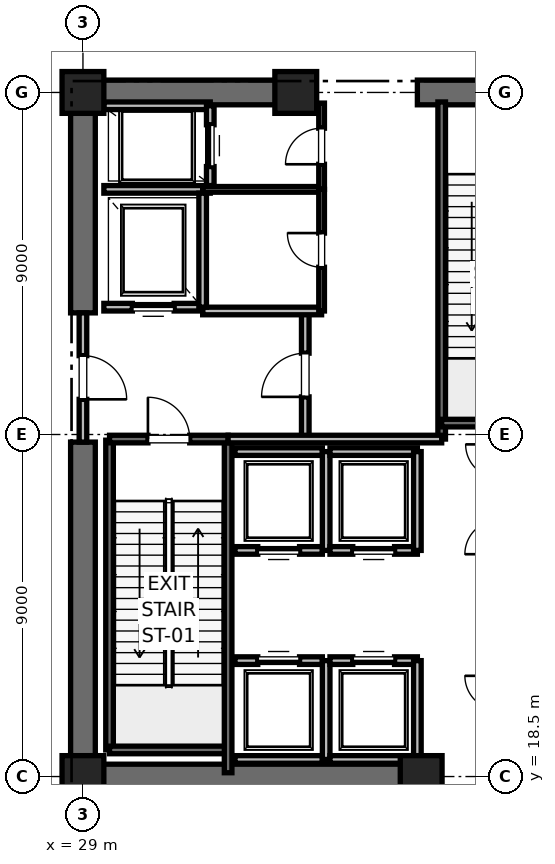
"""IFC4 building model, lengths in metres.
Left out: names, types, materials, properties, quantities, classifications, styles, units other than length and angle.
Written with IfcOpenShell. Run it as: python <this file> out.ifc"""

import sys

from ifc_helpers import new_model, si_unit, direction, frame, frame_2d, origin, origin_2d, place, context, subcontext, project, spatial, rectangle, extrude, element, fill, save


model = new_model("IFC4")
c1 = context("Model", 3, precision=1e-05, world=origin(), true_north=direction((0.0, 1.0)))
c2 = subcontext(c1, "Body", "Model", "MODEL_VIEW")
j1 = project(units=[si_unit("LENGTHUNIT", "METRE"), si_unit("PLANEANGLEUNIT", "RADIAN")], contexts=[c1])
p1 = place(None, origin())
s1 = spatial("IfcSite", under=j1, at=p1, CompositionType="ELEMENT")
p2 = place(p1, origin())
s2 = spatial("IfcBuilding", under=s1, at=p2, CompositionType="ELEMENT")
p3 = place(p2, origin())
s3 = spatial("IfcBuildingStorey", under=s2, at=p3, CompositionType="ELEMENT", Elevation=0.0)
for number, where, z_axis, x_axis in (
    (1, (29.0, 18.5, 0.0), (0.0, 0.0, 1.0), (1.0, 0.0, 0.0)),
    (2, (29.0, 36.5, 0.0), (0.0, 0.0, 1.0), (1.0, 0.0, 0.0)),
    (3, (37.9, 18.5, 0.0), (0.0, 0.0, 1.0), (1.0, 0.0, 0.0)),
    (4, (34.6, 36.5, 0.0), (0.0, 0.0, 1.0), (1.0, 0.0, 0.0)),
):
    element("IfcColumn", number, at=place(p3, frame(where, z_axis=z_axis, x_axis=x_axis)), inside=s3, PredefinedType="PILASTER", context=c2, shape_type="SweptSolid", body=[
        extrude(rectangle(XDim=1.1, YDim=1.1, at=origin_2d()), origin(), (0.0, 0.0, 1.0), 6.0),
    ])
p4 = place(p3, frame((29.0, 18.5, 0.0), z_axis=(0.0, 0.0, 1.0), x_axis=(1.0, 0.0, 0.0)))
e5 = element("IfcWall", 5, at=p4, inside=s3, PredefinedType="SHEAR", context=c2, shape_type="SweptSolid", body=[
    extrude(rectangle(XDim=9.2, YDim=0.65, at=frame_2d((4.6, 0.0))), origin(), (0.0, 0.0, 1.0), 5.72),
])
p5 = place(p3, frame((29.0, 36.5, 0.0), z_axis=(0.0, 0.0, 1.0), x_axis=(1.0, 0.0, 0.0)))
e6 = element("IfcWall", 6, at=p5, inside=s3, PredefinedType="SHEAR", context=c2, shape_type="SweptSolid", body=[
    extrude(rectangle(XDim=5.8, YDim=0.65, at=frame_2d((2.9, 0.0))), origin(), (0.0, 0.0, 1.0), 5.72),
])
p6 = place(p3, frame((37.8, 36.5, 0.0), z_axis=(0.0, 0.0, 1.0), x_axis=(1.0, 0.0, 0.0)))
e7 = element("IfcWall", 7, at=p6, inside=s3, PredefinedType="SHEAR", context=c2, shape_type="SweptSolid", body=[
    extrude(rectangle(XDim=4.4, YDim=0.65, at=frame_2d((2.2, 0.0))), origin(), (0.0, 0.0, 1.0), 5.72),
])
p7 = place(p6, frame((1.65, 0.0, 0.0)))
e8 = element("IfcOpeningElement", 8, at=p7, cuts=e7, PredefinedType="OPENING", context=c2, shape_type="SweptSolid", body=[
    extrude(rectangle(XDim=1.1, YDim=2.15, at=frame_2d((0.55, 1.075))), frame((0.0, 0.325, 0.0), z_axis=(0.0, -1.0, 0.0), x_axis=(1.0, 0.0, 0.0)), (0.0, 0.0, 1.0), 0.65),
])
p8 = place(p3, frame((29.0, 18.5, 0.0), z_axis=(0.0, 0.0, 1.0), x_axis=(0.0, 1.0, 0.0)))
e9 = element("IfcWall", 9, at=p8, inside=s3, PredefinedType="SHEAR", context=c2, shape_type="SweptSolid", body=[
    extrude(rectangle(XDim=8.8, YDim=0.65, at=frame_2d((4.4, 0.0))), origin(), (0.0, 0.0, 1.0), 5.72),
])
p9 = place(p3, frame((29.0, 30.7, 0.0), z_axis=(0.0, 0.0, 1.0), x_axis=(0.0, 1.0, 0.0)))
e10 = element("IfcWall", 10, at=p9, inside=s3, PredefinedType="SHEAR", context=c2, shape_type="SweptSolid", body=[
    extrude(rectangle(XDim=5.8, YDim=0.65, at=frame_2d((2.9, 0.0))), origin(), (0.0, 0.0, 1.0), 5.72),
])
p10 = place(p3, frame((29.7, 19.2, 0.0), z_axis=(0.0, 0.0, 1.0), x_axis=(0.0, 1.0, 0.0)))
e11 = element("IfcWall", 11, at=p10, inside=s3, PredefinedType="SOLIDWALL", context=c2, shape_type="SweptSolid", body=[
    extrude(rectangle(XDim=8.15, YDim=0.2, at=frame_2d((4.075, 0.0))), origin(), (0.0, 0.0, 1.0), 5.72),
])
p11 = place(p3, frame((29.7, 19.2, 0.0), z_axis=(0.0, 0.0, 1.0), x_axis=(1.0, 0.0, 0.0)))
e12 = element("IfcWall", 12, at=p11, inside=s3, PredefinedType="SOLIDWALL", context=c2, shape_type="SweptSolid", body=[
    extrude(rectangle(XDim=3.12, YDim=0.2, at=frame_2d((1.56, 0.0))), origin(), (0.0, 0.0, 1.0), 5.72),
])
p12 = place(p3, frame((32.82, 18.6, 0.0), z_axis=(0.0, 0.0, 1.0), x_axis=(0.0, 1.0, 0.0)))
e13 = element("IfcWall", 13, at=p12, inside=s3, PredefinedType="SOLIDWALL", context=c2, shape_type="SweptSolid", body=[
    extrude(rectangle(XDim=8.78, YDim=0.2, at=frame_2d((4.39, 0.0))), origin(), (0.0, 0.0, 1.0), 5.72),
])
p13 = place(p3, frame((29.7, 27.38, 0.0), z_axis=(0.0, 0.0, 1.0), x_axis=(1.0, 0.0, 0.0)))
e14 = element("IfcWall", 14, at=p13, inside=s3, PredefinedType="SOLIDWALL", context=c2, shape_type="SweptSolid", body=[
    extrude(rectangle(XDim=3.12, YDim=0.2, at=frame_2d((1.56, 0.0))), origin(), (0.0, 0.0, 1.0), 5.72),
])
p14 = place(p13, frame((1.01, 0.0, 0.0)))
e15 = element("IfcOpeningElement", 15, at=p14, cuts=e14, PredefinedType="OPENING", context=c2, shape_type="SweptSolid", body=[
    extrude(rectangle(XDim=1.1, YDim=2.15, at=frame_2d((0.55, 1.075))), frame((0.0, 0.1, 0.0), z_axis=(0.0, -1.0, 0.0), x_axis=(1.0, 0.0, 0.0)), (0.0, 0.0, 1.0), 0.2),
])
p15 = place(p3, frame((38.44, 27.38, 0.0), z_axis=(0.0, 0.0, 1.0), x_axis=(0.0, 1.0, 0.0)))
e16 = element("IfcWall", 16, at=p15, inside=s3, PredefinedType="SOLIDWALL", context=c2, shape_type="SweptSolid", body=[
    extrude(rectangle(XDim=8.87, YDim=0.2, at=frame_2d((4.435, 0.0))), origin(), (0.0, 0.0, 1.0), 5.72),
])
p16 = place(p3, frame((38.44, 27.8, 0.0), z_axis=(0.0, 0.0, 1.0), x_axis=(1.0, 0.0, 0.0)))
e17 = element("IfcWall", 17, at=p16, inside=s3, PredefinedType="SOLIDWALL", context=c2, shape_type="SweptSolid", body=[
    extrude(rectangle(XDim=3.32, YDim=0.2, at=frame_2d((1.66, 0.0))), origin(), (0.0, 0.0, 1.0), 5.72),
])
p17 = place(p3, frame((34.85, 27.38, 0.0), z_axis=(0.0, 0.0, 1.0), x_axis=(0.0, 1.0, 0.0)))
e18 = element("IfcWall", 18, at=p17, inside=s3, PredefinedType="PARTITIONING", context=c2, shape_type="SweptSolid", body=[
    extrude(rectangle(XDim=3.37, YDim=0.2, at=frame_2d((1.685, 0.0))), origin(), (0.0, 0.0, 1.0), 5.72),
])
p18 = place(p17, frame((1.11, 0.0, 0.0)))
e19 = element("IfcOpeningElement", 19, at=p18, cuts=e18, PredefinedType="OPENING", context=c2, shape_type="SweptSolid", body=[
    extrude(rectangle(XDim=1.15, YDim=2.2, at=frame_2d((0.575, 1.1))), frame((0.0, 0.1, 0.0), z_axis=(0.0, -1.0, 0.0), x_axis=(1.0, 0.0, 0.0)), (0.0, 0.0, 1.0), 0.2),
])
p19 = place(p3, frame((29.0, 30.7, 0.0), z_axis=(0.0, 0.0, 1.0), x_axis=(0.0, -1.0, 0.0)))
e20 = element("IfcWall", 20, at=p19, inside=s3, PredefinedType="PARTITIONING", context=c2, shape_type="SweptSolid", body=[
    extrude(rectangle(XDim=3.4, YDim=0.2, at=frame_2d((1.7, 0.0))), origin(), (0.0, 0.0, 1.0), 4.5),
])
p20 = place(p19, frame((1.125, 0.0, 0.0)))
e21 = element("IfcOpeningElement", 21, at=p20, cuts=e20, PredefinedType="OPENING", context=c2, shape_type="SweptSolid", body=[
    extrude(rectangle(XDim=1.15, YDim=2.2, at=frame_2d((0.575, 1.1))), frame((0.0, 0.1, 0.0), z_axis=(0.0, -1.0, 0.0), x_axis=(1.0, 0.0, 0.0)), (0.0, 0.0, 1.0), 0.2),
])
p21 = place(p3, frame((32.82, 27.38, 0.0), z_axis=(0.0, 0.0, 1.0), x_axis=(1.0, 0.0, 0.0)))
e22 = element("IfcWall", 22, at=p21, inside=s3, PredefinedType="PARTITIONING", context=c2, shape_type="SweptSolid", body=[
    extrude(rectangle(XDim=5.62, YDim=0.2, at=frame_2d((2.81, 0.0))), origin(), (0.0, 0.0, 1.0), 5.72),
])
p22 = place(p3, frame((32.15, 30.75, 0.0), z_axis=(0.0, 0.0, 1.0), x_axis=(1.0, 0.0, 0.0)))
e23 = element("IfcWall", 23, at=p22, inside=s3, PredefinedType="PARTITIONING", context=c2, shape_type="SweptSolid", body=[
    extrude(rectangle(XDim=3.13, YDim=0.2, at=frame_2d((1.565, 0.0))), origin(), (0.0, 0.0, 1.0), 5.72),
])
p23 = place(p3, frame((29.55, 30.85, 0.0), z_axis=(0.0, 0.0, 1.0), x_axis=(1.0, 0.0, 0.0)))
e24 = element("IfcWall", 24, at=p23, inside=s3, PredefinedType="SOLIDWALL", context=c2, shape_type="SweptSolid", body=[
    extrude(rectangle(XDim=2.6, YDim=0.2, at=frame_2d((1.3, 0.0))), origin(), (0.0, 0.0, 1.0), 4.5),
])
p24 = place(p23, frame((0.75, 0.0, 0.0)))
e25 = element("IfcOpeningElement", 25, at=p24, cuts=e24, PredefinedType="OPENING", context=c2, shape_type="SweptSolid", body=[
    extrude(rectangle(XDim=1.1, YDim=2.2, at=frame_2d((0.55, 1.1))), frame((0.0, 0.1, 0.0), z_axis=(0.0, -1.0, 0.0), x_axis=(1.0, 0.0, 0.0)), (0.0, 0.0, 1.0), 0.2),
])
p25 = place(p3, frame((29.55, 33.95, 0.0), z_axis=(0.0, 0.0, 1.0), x_axis=(1.0, 0.0, 0.0)))
e26 = element("IfcWall", 26, at=p25, inside=s3, PredefinedType="SOLIDWALL", context=c2, shape_type="SweptSolid", body=[
    extrude(rectangle(XDim=2.8, YDim=0.2, at=frame_2d((1.4, 0.0))), origin(), (0.0, 0.0, 1.0), 5.72),
])
p26 = place(p3, frame((32.15, 30.85, 0.0), z_axis=(0.0, 0.0, 1.0), x_axis=(0.0, 1.0, 0.0)))
e27 = element("IfcWall", 27, at=p26, inside=s3, PredefinedType="SOLIDWALL", context=c2, shape_type="SweptSolid", body=[
    extrude(rectangle(XDim=3.0, YDim=0.2, at=frame_2d((1.5, 0.0))), origin(), (0.0, 0.0, 1.0), 5.72),
])
p27 = place(p3, frame((32.35, 36.15, 0.0), z_axis=(0.0, 0.0, 1.0), x_axis=(-1.0, 0.0, 0.0)))
e28 = element("IfcWall", 28, at=p27, inside=s3, PredefinedType="SOLIDWALL", context=c2, shape_type="SweptSolid", body=[
    extrude(rectangle(XDim=2.8, YDim=0.2, at=frame_2d((1.4, 0.0))), origin(), (0.0, 0.0, 1.0), 4.779),
])
p28 = place(p3, frame((32.35, 34.05, 0.0), z_axis=(0.0, 0.0, 1.0), x_axis=(0.0, 1.0, 0.0)))
e29 = element("IfcWall", 29, at=p28, inside=s3, PredefinedType="SOLIDWALL", context=c2, shape_type="SweptSolid", body=[
    extrude(rectangle(XDim=2.1, YDim=0.2, at=frame_2d((1.05, 0.0))), origin(), (0.0, 0.0, 1.0), 5.72),
])
p29 = place(p28, frame((0.5, 0.0, 0.0)))
e30 = element("IfcOpeningElement", 30, at=p29, cuts=e29, PredefinedType="OPENING", context=c2, shape_type="SweptSolid", body=[
    extrude(rectangle(XDim=1.1, YDim=2.2, at=frame_2d((0.55, 1.1))), frame((0.0, 0.1, 0.0), z_axis=(0.0, -1.0, 0.0), x_axis=(1.0, 0.0, 0.0)), (0.0, 0.0, 1.0), 0.2),
])
p30 = place(p3, frame((33.0, 18.95, 0.0), z_axis=(0.0, 0.0, 1.0), x_axis=(1.0, 0.0, 0.0)))
e31 = element("IfcWall", 31, at=p30, inside=s3, PredefinedType="SOLIDWALL", context=c2, shape_type="SweptSolid", body=[
    extrude(rectangle(XDim=2.3, YDim=0.2, at=frame_2d((1.15, 0.0))), origin(), (0.0, 0.0, 1.0), 5.72),
])
p31 = place(p3, frame((35.3, 21.55, 0.0), z_axis=(0.0, 0.0, 1.0), x_axis=(-1.0, 0.0, 0.0)))
e32 = element("IfcWall", 32, at=p31, inside=s3, PredefinedType="SOLIDWALL", context=c2, shape_type="SweptSolid", body=[
    extrude(rectangle(XDim=2.3, YDim=0.2, at=frame_2d((1.15, 0.0))), origin(), (0.0, 0.0, 1.0), 5.72),
])
p32 = place(p31, frame((0.6, 0.0, 0.0)))
e33 = element("IfcOpeningElement", 33, at=p32, cuts=e32, PredefinedType="OPENING", context=c2, shape_type="SweptSolid", body=[
    extrude(rectangle(XDim=1.1, YDim=2.2, at=frame_2d((0.55, 1.1))), frame((0.0, 0.1, 0.0), z_axis=(0.0, -1.0, 0.0), x_axis=(1.0, 0.0, 0.0)), (0.0, 0.0, 1.0), 0.2),
])
p33 = place(p3, frame((35.4, 18.95, 0.0), z_axis=(0.0, 0.0, 1.0), x_axis=(0.0, 1.0, 0.0)))
e34 = element("IfcWall", 34, at=p33, inside=s3, PredefinedType="SOLIDWALL", context=c2, shape_type="SweptSolid", body=[
    extrude(rectangle(XDim=2.6, YDim=0.2, at=frame_2d((1.3, 0.0))), origin(), (0.0, 0.0, 1.0), 5.72),
])
p34 = place(p3, frame((35.5, 18.95, 0.0), z_axis=(0.0, 0.0, 1.0), x_axis=(1.0, 0.0, 0.0)))
e35 = element("IfcWall", 35, at=p34, inside=s3, PredefinedType="SOLIDWALL", context=c2, shape_type="SweptSolid", body=[
    extrude(rectangle(XDim=2.3, YDim=0.2, at=frame_2d((1.15, 0.0))), origin(), (0.0, 0.0, 1.0), 4.5),
])
p35 = place(p3, frame((37.8, 21.55, 0.0), z_axis=(0.0, 0.0, 1.0), x_axis=(-1.0, 0.0, 0.0)))
e36 = element("IfcWall", 36, at=p35, inside=s3, PredefinedType="SOLIDWALL", context=c2, shape_type="SweptSolid", body=[
    extrude(rectangle(XDim=2.3, YDim=0.2, at=frame_2d((1.15, 0.0))), origin(), (0.0, 0.0, 1.0), 5.72),
])
p36 = place(p35, frame((0.6, 0.0, 0.0)))
e37 = element("IfcOpeningElement", 37, at=p36, cuts=e36, PredefinedType="OPENING", context=c2, shape_type="SweptSolid", body=[
    extrude(rectangle(XDim=1.1, YDim=2.2, at=frame_2d((0.55, 1.1))), frame((0.0, 0.1, 0.0), z_axis=(0.0, -1.0, 0.0), x_axis=(1.0, 0.0, 0.0)), (0.0, 0.0, 1.0), 0.2),
])
p37 = place(p3, frame((37.8, 18.95, 0.0), z_axis=(0.0, 0.0, 1.0), x_axis=(0.0, 1.0, 0.0)))
e38 = element("IfcWall", 38, at=p37, inside=s3, PredefinedType="SOLIDWALL", context=c2, shape_type="SweptSolid", body=[
    extrude(rectangle(XDim=2.6, YDim=0.2, at=frame_2d((1.3, 0.0))), origin(), (0.0, 0.0, 1.0), 4.5),
])
p38 = place(p3, frame((33.0, 24.45, 0.0), z_axis=(0.0, 0.0, 1.0), x_axis=(1.0, 0.0, 0.0)))
e39 = element("IfcWall", 39, at=p38, inside=s3, PredefinedType="SOLIDWALL", context=c2, shape_type="SweptSolid", body=[
    extrude(rectangle(XDim=2.3, YDim=0.2, at=frame_2d((1.15, 0.0))), origin(), (0.0, 0.0, 1.0), 5.72),
])
p39 = place(p38, frame((0.6, 0.0, 0.0)))
e40 = element("IfcOpeningElement", 40, at=p39, cuts=e39, PredefinedType="OPENING", context=c2, shape_type="SweptSolid", body=[
    extrude(rectangle(XDim=1.1, YDim=2.2, at=frame_2d((0.55, 1.1))), frame((0.0, 0.1, 0.0), z_axis=(0.0, -1.0, 0.0), x_axis=(1.0, 0.0, 0.0)), (0.0, 0.0, 1.0), 0.2),
])
p40 = place(p3, frame((35.3, 27.05, 0.0), z_axis=(0.0, 0.0, 1.0), x_axis=(-1.0, 0.0, 0.0)))
e41 = element("IfcWall", 41, at=p40, inside=s3, PredefinedType="SOLIDWALL", context=c2, shape_type="SweptSolid", body=[
    extrude(rectangle(XDim=2.3, YDim=0.2, at=frame_2d((1.15, 0.0))), origin(), (0.0, 0.0, 1.0), 5.72),
])
p41 = place(p3, frame((35.4, 24.45, 0.0), z_axis=(0.0, 0.0, 1.0), x_axis=(0.0, 1.0, 0.0)))
e42 = element("IfcWall", 42, at=p41, inside=s3, PredefinedType="SOLIDWALL", context=c2, shape_type="SweptSolid", body=[
    extrude(rectangle(XDim=2.6, YDim=0.2, at=frame_2d((1.3, 0.0))), origin(), (0.0, 0.0, 1.0), 5.72),
])
p42 = place(p3, frame((35.5, 24.45, 0.0), z_axis=(0.0, 0.0, 1.0), x_axis=(1.0, 0.0, 0.0)))
e43 = element("IfcWall", 43, at=p42, inside=s3, PredefinedType="SOLIDWALL", context=c2, shape_type="SweptSolid", body=[
    extrude(rectangle(XDim=2.3, YDim=0.2, at=frame_2d((1.15, 0.0))), origin(), (0.0, 0.0, 1.0), 5.72),
])
p43 = place(p42, frame((0.6, 0.0, 0.0)))
e44 = element("IfcOpeningElement", 44, at=p43, cuts=e43, PredefinedType="OPENING", context=c2, shape_type="SweptSolid", body=[
    extrude(rectangle(XDim=1.1, YDim=2.2, at=frame_2d((0.55, 1.1))), frame((0.0, 0.1, 0.0), z_axis=(0.0, -1.0, 0.0), x_axis=(1.0, 0.0, 0.0)), (0.0, 0.0, 1.0), 0.2),
])
p44 = place(p3, frame((37.8, 27.05, 0.0), z_axis=(0.0, 0.0, 1.0), x_axis=(-1.0, 0.0, 0.0)))
e45 = element("IfcWall", 45, at=p44, inside=s3, PredefinedType="SOLIDWALL", context=c2, shape_type="SweptSolid", body=[
    extrude(rectangle(XDim=2.3, YDim=0.2, at=frame_2d((1.15, 0.0))), origin(), (0.0, 0.0, 1.0), 5.72),
])
p45 = place(p3, frame((37.8, 24.45, 0.0), z_axis=(0.0, 0.0, 1.0), x_axis=(0.0, 1.0, 0.0)))
e46 = element("IfcWall", 46, at=p45, inside=s3, PredefinedType="SOLIDWALL", context=c2, shape_type="SweptSolid", body=[
    extrude(rectangle(XDim=2.6, YDim=0.2, at=frame_2d((1.3, 0.0))), origin(), (0.0, 0.0, 1.0), 5.72),
])
p46 = place(p3, frame((32.15, 33.95, 0.0), z_axis=(0.0, 0.0, 1.0), x_axis=(1.0, 0.0, 0.0)))
e47 = element("IfcWall", 47, at=p46, inside=s3, PredefinedType="PARTITIONING", context=c2, shape_type="SweptSolid", body=[
    extrude(rectangle(XDim=3.13, YDim=0.15, at=frame_2d((1.565, 0.0))), origin(), (0.0, 0.0, 1.0), 2.85),
])
p47 = place(p3, frame((35.28, 33.95, 0.0), z_axis=(0.0, 0.0, 1.0), x_axis=(0.0, 1.0, 0.0)))
e48 = element("IfcWall", 48, at=p47, inside=s3, PredefinedType="PARTITIONING", context=c2, shape_type="SweptSolid", body=[
    extrude(rectangle(XDim=2.27, YDim=0.15, at=frame_2d((1.135, 0.0))), origin(), (0.0, 0.0, 1.0), 2.85),
])
p48 = place(p47, frame((0.66, 0.0, 0.0)))
e49 = element("IfcOpeningElement", 49, at=p48, cuts=e48, PredefinedType="OPENING", context=c2, shape_type="SweptSolid", body=[
    extrude(rectangle(XDim=0.95, YDim=2.15, at=frame_2d((0.475, 1.075))), frame((0.0, 0.075, 0.0), z_axis=(0.0, -1.0, 0.0), x_axis=(1.0, 0.0, 0.0)), (0.0, 0.0, 1.0), 0.15),
])
p49 = place(p3, frame((35.28, 30.75, 0.0), z_axis=(0.0, 0.0, 1.0), x_axis=(0.0, 1.0, 0.0)))
e50 = element("IfcWall", 50, at=p49, inside=s3, PredefinedType="PARTITIONING", context=c2, shape_type="SweptSolid", body=[
    extrude(rectangle(XDim=3.2, YDim=0.15, at=frame_2d((1.6, 0.0))), origin(), (0.0, 0.0, 1.0), 2.85),
])
p50 = place(p49, frame((1.15, 0.0, 0.0)))
e51 = element("IfcOpeningElement", 51, at=p50, cuts=e50, PredefinedType="OPENING", context=c2, shape_type="SweptSolid", body=[
    extrude(rectangle(XDim=0.9, YDim=2.1, at=frame_2d((0.45, 1.05))), frame((0.0, 0.075, 0.0), z_axis=(0.0, -1.0, 0.0), x_axis=(1.0, 0.0, 0.0)), (0.0, 0.0, 1.0), 0.15),
])
p51 = place(p3, frame((28.85, -1.35, 0.0), z_axis=(0.0, 0.0, 1.0), x_axis=(0.0, 1.0, 0.0)))
e52 = element("IfcWall", 52, at=p51, inside=s3, PredefinedType="PARTITIONING", context=c2, shape_type="SweptSolid", body=[
    extrude(rectangle(XDim=19.75, YDim=0.2, at=frame_2d((9.875, 0.0))), origin(), (0.0, 0.0, 1.0), 2.85),
])
p52 = place(p51, frame((9.3, 0.0, 0.0)))
e53 = element("IfcOpeningElement", 53, at=p52, cuts=e52, PredefinedType="OPENING", context=c2, shape_type="SweptSolid", body=[
    extrude(rectangle(XDim=1.15, YDim=2.2, at=frame_2d((0.575, 1.1))), frame((0.0, 0.1, 0.0), z_axis=(0.0, -1.0, 0.0), x_axis=(1.0, 0.0, 0.0)), (0.0, 0.0, 1.0), 0.2),
])
p53 = place(p14, origin())
e54 = element("IfcDoor", 54, at=p53, inside=s3, OperationType="SINGLE_SWING_LEFT", PredefinedType="DOOR", context=c2, shape_type="SweptSolid", body=[
    extrude(rectangle(XDim=1.1, YDim=2.15, at=frame_2d((0.55, 1.075))), frame((0.0, 0.025, 0.0), z_axis=(0.0, -1.0, 0.0), x_axis=(1.0, 0.0, 0.0)), (0.0, 0.0, 1.0), 0.05),
])
fill(e15, e54)
p54 = place(p18, origin())
e55 = element("IfcDoor", 55, at=p54, inside=s3, OperationType="SINGLE_SWING_LEFT", PredefinedType="DOOR", context=c2, shape_type="SweptSolid", body=[
    extrude(rectangle(XDim=1.15, YDim=2.2, at=frame_2d((0.575, 1.1))), frame((0.0, 0.025, 0.0), z_axis=(0.0, -1.0, 0.0), x_axis=(1.0, 0.0, 0.0)), (0.0, 0.0, 1.0), 0.05),
])
fill(e19, e55)
p55 = place(p20, origin())
e56 = element("IfcDoor", 56, at=p55, inside=s3, OperationType="SINGLE_SWING_RIGHT", PredefinedType="DOOR", context=c2, shape_type="SweptSolid", body=[
    extrude(rectangle(XDim=1.15, YDim=2.2, at=frame_2d((0.575, 1.1))), frame((0.0, 0.025, 0.0), z_axis=(0.0, -1.0, 0.0), x_axis=(1.0, 0.0, 0.0)), (0.0, 0.0, 1.0), 0.05),
])
fill(e21, e56)
p56 = place(p24, origin())
e57 = element("IfcDoor", 57, at=p56, inside=s3, OperationType="SLIDING_TO_RIGHT", PredefinedType="DOOR", context=c2, shape_type="SweptSolid", body=[
    extrude(rectangle(XDim=1.1, YDim=2.2, at=frame_2d((0.55, 1.1))), frame((0.0, 0.025, 0.0), z_axis=(0.0, -1.0, 0.0), x_axis=(1.0, 0.0, 0.0)), (0.0, 0.0, 1.0), 0.05),
])
fill(e25, e57)
p57 = place(p29, origin())
e58 = element("IfcDoor", 58, at=p57, inside=s3, OperationType="SLIDING_TO_RIGHT", PredefinedType="DOOR", context=c2, shape_type="SweptSolid", body=[
    extrude(rectangle(XDim=1.1, YDim=2.2, at=frame_2d((0.55, 1.1))), frame((0.0, 0.025, 0.0), z_axis=(0.0, -1.0, 0.0), x_axis=(1.0, 0.0, 0.0)), (0.0, 0.0, 1.0), 0.05),
])
fill(e30, e58)
p58 = place(p32, origin())
e59 = element("IfcDoor", 59, at=p58, inside=s3, OperationType="SLIDING_TO_RIGHT", PredefinedType="DOOR", context=c2, shape_type="SweptSolid", body=[
    extrude(rectangle(XDim=1.1, YDim=2.2, at=frame_2d((0.55, 1.1))), frame((0.0, 0.025, 0.0), z_axis=(0.0, -1.0, 0.0), x_axis=(1.0, 0.0, 0.0)), (0.0, 0.0, 1.0), 0.05),
])
fill(e33, e59)
p59 = place(p36, origin())
e60 = element("IfcDoor", 60, at=p59, inside=s3, OperationType="SLIDING_TO_RIGHT", PredefinedType="DOOR", context=c2, shape_type="SweptSolid", body=[
    extrude(rectangle(XDim=1.1, YDim=2.2, at=frame_2d((0.55, 1.1))), frame((0.0, 0.025, 0.0), z_axis=(0.0, -1.0, 0.0), x_axis=(1.0, 0.0, 0.0)), (0.0, 0.0, 1.0), 0.05),
])
fill(e37, e60)
p60 = place(p39, origin())
e61 = element("IfcDoor", 61, at=p60, inside=s3, OperationType="SLIDING_TO_RIGHT", PredefinedType="DOOR", context=c2, shape_type="SweptSolid", body=[
    extrude(rectangle(XDim=1.1, YDim=2.2, at=frame_2d((0.55, 1.1))), frame((0.0, 0.025, 0.0), z_axis=(0.0, -1.0, 0.0), x_axis=(1.0, 0.0, 0.0)), (0.0, 0.0, 1.0), 0.05),
])
fill(e40, e61)
p61 = place(p43, origin())
e62 = element("IfcDoor", 62, at=p61, inside=s3, OperationType="SLIDING_TO_RIGHT", PredefinedType="DOOR", context=c2, shape_type="SweptSolid", body=[
    extrude(rectangle(XDim=1.1, YDim=2.2, at=frame_2d((0.55, 1.1))), frame((0.0, 0.025, 0.0), z_axis=(0.0, -1.0, 0.0), x_axis=(1.0, 0.0, 0.0)), (0.0, 0.0, 1.0), 0.05),
])
fill(e44, e62)
p62 = place(p48, origin())
e63 = element("IfcDoor", 63, at=p62, inside=s3, OperationType="SINGLE_SWING_LEFT", PredefinedType="DOOR", context=c2, shape_type="SweptSolid", body=[
    extrude(rectangle(XDim=0.95, YDim=2.15, at=frame_2d((0.475, 1.075))), frame((0.0, 0.025, 0.0), z_axis=(0.0, -1.0, 0.0), x_axis=(1.0, 0.0, 0.0)), (0.0, 0.0, 1.0), 0.05),
])
fill(e49, e63)
p63 = place(p50, origin())
e64 = element("IfcDoor", 64, at=p63, inside=s3, OperationType="SINGLE_SWING_RIGHT", PredefinedType="DOOR", context=c2, shape_type="SweptSolid", body=[
    extrude(rectangle(XDim=0.9, YDim=2.1, at=frame_2d((0.45, 1.05))), frame((0.0, 0.025, 0.0), z_axis=(0.0, -1.0, 0.0), x_axis=(1.0, 0.0, 0.0)), (0.0, 0.0, 1.0), 0.05),
])
fill(e51, e64)
save(model, sys.argv[1])
